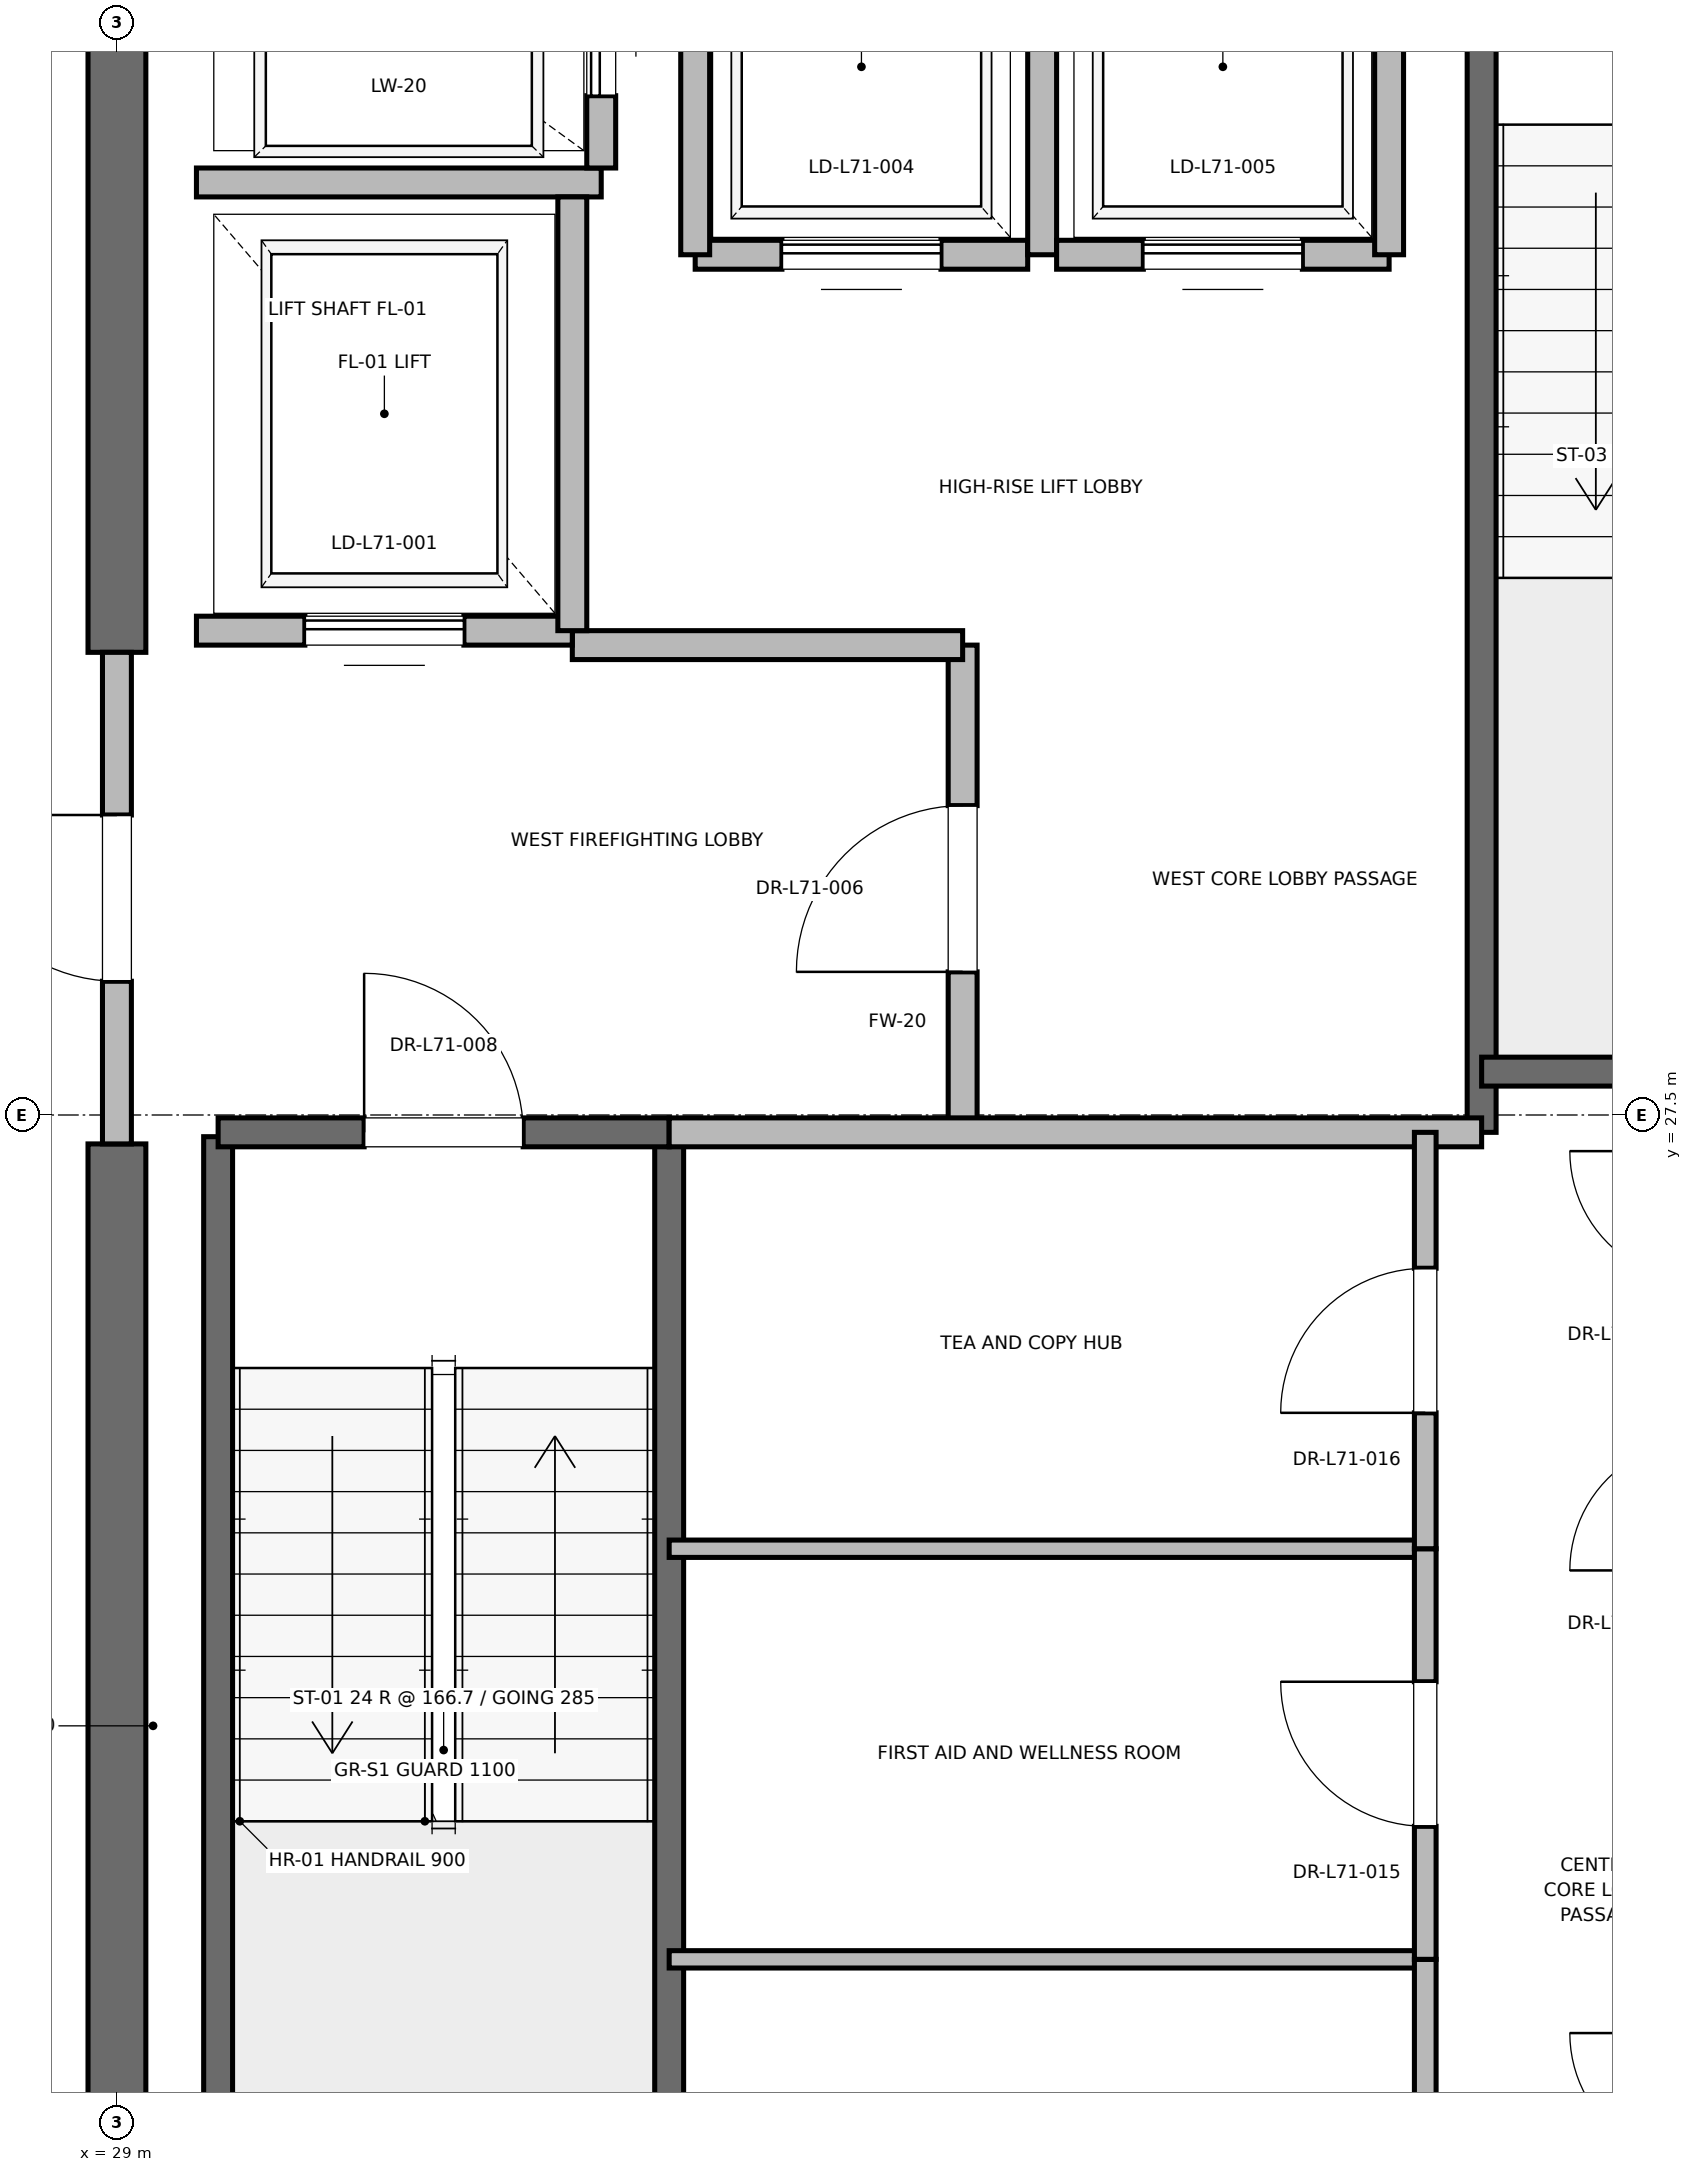
"""IFC4 building model, lengths in metres.
Left out: names, types, materials, properties, quantities, classifications, styles, units other than length and angle.
Written with IfcOpenShell. Run it as: python <this file> out.ifc"""

import sys

from ifc_helpers import new_model, si_unit, direction, frame, frame_2d, origin, place, context, subcontext, project, spatial, rectangle, extrude, element, fill, save


model = new_model("IFC4")
c1 = context("Model", 3, precision=1e-05, world=origin(), true_north=direction((0.0, 1.0)))
c2 = subcontext(c1, "Body", "Model", "MODEL_VIEW")
j1 = project(units=[si_unit("LENGTHUNIT", "METRE"), si_unit("PLANEANGLEUNIT", "RADIAN")], contexts=[c1])
p1 = place(None, origin())
s1 = spatial("IfcSite", under=j1, at=p1, CompositionType="ELEMENT")
p2 = place(p1, origin())
s2 = spatial("IfcBuilding", under=s1, at=p2, CompositionType="ELEMENT")
p3 = place(p2, frame((0.0, 0.0, 306.8)))
s3 = spatial("IfcBuildingStorey", under=s2, at=p3, CompositionType="ELEMENT", Elevation=306.8)
p4 = place(p3, frame((29.0, 18.5, 0.0), z_axis=(0.0, 0.0, 1.0), x_axis=(0.0, 1.0, 0.0)))
e1 = element("IfcWall", 1, at=p4, inside=s3, PredefinedType="SHEAR", context=c2, shape_type="SweptSolid", body=[
    extrude(rectangle(XDim=8.8, YDim=0.4, at=frame_2d((4.4, 0.0))), origin(), (0.0, 0.0, 1.0), 3.785),
])
p5 = place(p3, frame((29.0, 30.7, 0.0), z_axis=(0.0, 0.0, 1.0), x_axis=(0.0, 1.0, 0.0)))
e2 = element("IfcWall", 2, at=p5, inside=s3, PredefinedType="SHEAR", context=c2, shape_type="SweptSolid", body=[
    extrude(rectangle(XDim=5.8, YDim=0.4, at=frame_2d((2.9, 0.0))), origin(), (0.0, 0.0, 1.0), 3.785),
])
p6 = place(p3, frame((29.7, 19.2, 0.0), z_axis=(0.0, 0.0, 1.0), x_axis=(0.0, 1.0, 0.0)))
e3 = element("IfcWall", 3, at=p6, inside=s3, PredefinedType="SOLIDWALL", context=c2, shape_type="SweptSolid", body=[
    extrude(rectangle(XDim=8.15, YDim=0.2, at=frame_2d((4.075, 0.0))), origin(), (0.0, 0.0, 1.0), 3.785),
])
p7 = place(p3, frame((32.82, 18.6, 0.0), z_axis=(0.0, 0.0, 1.0), x_axis=(0.0, 1.0, 0.0)))
e4 = element("IfcWall", 4, at=p7, inside=s3, PredefinedType="SOLIDWALL", context=c2, shape_type="SweptSolid", body=[
    extrude(rectangle(XDim=8.78, YDim=0.2, at=frame_2d((4.39, 0.0))), origin(), (0.0, 0.0, 1.0), 3.785),
])
p8 = place(p3, frame((29.7, 27.38, 0.0), z_axis=(0.0, 0.0, 1.0), x_axis=(1.0, 0.0, 0.0)))
e5 = element("IfcWall", 5, at=p8, inside=s3, PredefinedType="SOLIDWALL", context=c2, shape_type="SweptSolid", body=[
    extrude(rectangle(XDim=3.12, YDim=0.2, at=frame_2d((1.56, 0.0))), origin(), (0.0, 0.0, 1.0), 3.785),
])
p9 = place(p8, frame((1.01, 0.0, 0.0)))
e6 = element("IfcOpeningElement", 6, at=p9, cuts=e5, PredefinedType="OPENING", context=c2, shape_type="SweptSolid", body=[
    extrude(rectangle(XDim=1.1, YDim=2.15, at=frame_2d((0.55, 1.075))), frame((0.0, 0.1, 0.0), z_axis=(0.0, -1.0, 0.0), x_axis=(1.0, 0.0, 0.0)), (0.0, 0.0, 1.0), 0.2),
])
p10 = place(p3, frame((38.44, 27.38, 0.0), z_axis=(0.0, 0.0, 1.0), x_axis=(0.0, 1.0, 0.0)))
e7 = element("IfcWall", 7, at=p10, inside=s3, PredefinedType="SOLIDWALL", context=c2, shape_type="SweptSolid", body=[
    extrude(rectangle(XDim=8.87, YDim=0.2, at=frame_2d((4.435, 0.0))), origin(), (0.0, 0.0, 1.0), 3.785),
])
p11 = place(p3, frame((38.44, 27.8, 0.0), z_axis=(0.0, 0.0, 1.0), x_axis=(1.0, 0.0, 0.0)))
e8 = element("IfcWall", 8, at=p11, inside=s3, PredefinedType="SOLIDWALL", context=c2, shape_type="SweptSolid", body=[
    extrude(rectangle(XDim=3.32, YDim=0.2, at=frame_2d((1.66, 0.0))), origin(), (0.0, 0.0, 1.0), 3.785),
])
p12 = place(p3, frame((34.85, 27.38, 0.0), z_axis=(0.0, 0.0, 1.0), x_axis=(0.0, 1.0, 0.0)))
e9 = element("IfcWall", 9, at=p12, inside=s3, PredefinedType="PARTITIONING", context=c2, shape_type="SweptSolid", body=[
    extrude(rectangle(XDim=3.37, YDim=0.2, at=frame_2d((1.685, 0.0))), origin(), (0.0, 0.0, 1.0), 3.785),
])
p13 = place(p12, frame((1.11, 0.0, 0.0)))
e10 = element("IfcOpeningElement", 10, at=p13, cuts=e9, PredefinedType="OPENING", context=c2, shape_type="SweptSolid", body=[
    extrude(rectangle(XDim=1.15, YDim=2.2, at=frame_2d((0.575, 1.1))), frame((0.0, 0.1, 0.0), z_axis=(0.0, -1.0, 0.0), x_axis=(1.0, 0.0, 0.0)), (0.0, 0.0, 1.0), 0.2),
])
p14 = place(p3, frame((29.0, 27.3, 0.0), z_axis=(0.0, 0.0, 1.0), x_axis=(0.0, 1.0, 0.0)))
e11 = element("IfcWall", 11, at=p14, inside=s3, PredefinedType="PARTITIONING", context=c2, shape_type="SweptSolid", body=[
    extrude(rectangle(XDim=3.4, YDim=0.2, at=frame_2d((1.7, 0.0))), origin(), (0.0, 0.0, 1.0), 2.865),
])
p15 = place(p14, frame((1.125, 0.0, 0.0)))
e12 = element("IfcOpeningElement", 12, at=p15, cuts=e11, PredefinedType="OPENING", context=c2, shape_type="SweptSolid", body=[
    extrude(rectangle(XDim=1.15, YDim=2.2, at=frame_2d((0.575, 1.1))), frame((0.0, 0.1, 0.0), z_axis=(0.0, -1.0, 0.0), x_axis=(1.0, 0.0, 0.0)), (0.0, 0.0, 1.0), 0.2),
])
p16 = place(p3, frame((32.82, 27.38, 0.0), z_axis=(0.0, 0.0, 1.0), x_axis=(1.0, 0.0, 0.0)))
e13 = element("IfcWall", 13, at=p16, inside=s3, PredefinedType="PARTITIONING", context=c2, shape_type="SweptSolid", body=[
    extrude(rectangle(XDim=5.62, YDim=0.2, at=frame_2d((2.81, 0.0))), origin(), (0.0, 0.0, 1.0), 3.785),
])
p17 = place(p3, frame((32.15, 30.75, 0.0), z_axis=(0.0, 0.0, 1.0), x_axis=(1.0, 0.0, 0.0)))
e14 = element("IfcWall", 14, at=p17, inside=s3, PredefinedType="PARTITIONING", context=c2, shape_type="SweptSolid", body=[
    extrude(rectangle(XDim=2.7, YDim=0.2, at=frame_2d((1.35, 0.0))), origin(), (0.0, 0.0, 1.0), 3.785),
])
p18 = place(p3, frame((29.55, 30.85, 0.0), z_axis=(0.0, 0.0, 1.0), x_axis=(1.0, 0.0, 0.0)))
e15 = element("IfcWall", 15, at=p18, inside=s3, PredefinedType="SOLIDWALL", context=c2, shape_type="SweptSolid", body=[
    extrude(rectangle(XDim=2.6, YDim=0.2, at=frame_2d((1.3, 0.0))), origin(), (0.0, 0.0, 1.0), 2.865),
])
p19 = place(p18, frame((0.75, 0.0, 0.0)))
e16 = element("IfcOpeningElement", 16, at=p19, cuts=e15, PredefinedType="OPENING", context=c2, shape_type="SweptSolid", body=[
    extrude(rectangle(XDim=1.1, YDim=2.2, at=frame_2d((0.55, 1.1))), frame((0.0, 0.1, 0.0), z_axis=(0.0, -1.0, 0.0), x_axis=(1.0, 0.0, 0.0)), (0.0, 0.0, 1.0), 0.2),
])
p20 = place(p3, frame((29.55, 33.95, 0.0), z_axis=(0.0, 0.0, 1.0), x_axis=(1.0, 0.0, 0.0)))
e17 = element("IfcWall", 17, at=p20, inside=s3, PredefinedType="SOLIDWALL", context=c2, shape_type="SweptSolid", body=[
    extrude(rectangle(XDim=2.8, YDim=0.2, at=frame_2d((1.4, 0.0))), origin(), (0.0, 0.0, 1.0), 3.785),
])
p21 = place(p3, frame((32.15, 30.85, 0.0), z_axis=(0.0, 0.0, 1.0), x_axis=(0.0, 1.0, 0.0)))
e18 = element("IfcWall", 18, at=p21, inside=s3, PredefinedType="SOLIDWALL", context=c2, shape_type="SweptSolid", body=[
    extrude(rectangle(XDim=3.0, YDim=0.2, at=frame_2d((1.5, 0.0))), origin(), (0.0, 0.0, 1.0), 3.785),
])
p22 = place(p3, frame((32.35, 34.05, 0.0), z_axis=(0.0, 0.0, 1.0), x_axis=(0.0, 1.0, 0.0)))
e19 = element("IfcWall", 19, at=p22, inside=s3, PredefinedType="SOLIDWALL", context=c2, shape_type="SweptSolid", body=[
    extrude(rectangle(XDim=2.1, YDim=0.2, at=frame_2d((1.05, 0.0))), origin(), (0.0, 0.0, 1.0), 3.785),
])
p23 = place(p22, frame((0.5, 0.0, 0.0)))
e20 = element("IfcOpeningElement", 20, at=p23, cuts=e19, PredefinedType="OPENING", context=c2, shape_type="SweptSolid", body=[
    extrude(rectangle(XDim=1.1, YDim=2.2, at=frame_2d((0.55, 1.1))), frame((0.0, 0.1, 0.0), z_axis=(0.0, -1.0, 0.0), x_axis=(1.0, 0.0, 0.0)), (0.0, 0.0, 1.0), 0.2),
])
p24 = place(p3, frame((33.0, 33.45, 0.0), z_axis=(0.0, 0.0, 1.0), x_axis=(1.0, 0.0, 0.0)))
e21 = element("IfcWall", 21, at=p24, inside=s3, PredefinedType="SOLIDWALL", context=c2, shape_type="SweptSolid", body=[
    extrude(rectangle(XDim=2.3, YDim=0.2, at=frame_2d((1.15, 0.0))), origin(), (0.0, 0.0, 1.0), 3.785),
])
p25 = place(p24, frame((0.6, 0.0, 0.0)))
e22 = element("IfcOpeningElement", 22, at=p25, cuts=e21, PredefinedType="OPENING", context=c2, shape_type="SweptSolid", body=[
    extrude(rectangle(XDim=1.1, YDim=2.2, at=frame_2d((0.55, 1.1))), frame((0.0, 0.1, 0.0), z_axis=(0.0, -1.0, 0.0), x_axis=(1.0, 0.0, 0.0)), (0.0, 0.0, 1.0), 0.2),
])
p26 = place(p3, frame((33.0, 36.05, 0.0), z_axis=(0.0, 0.0, 1.0), x_axis=(0.0, -1.0, 0.0)))
e23 = element("IfcWall", 23, at=p26, inside=s3, PredefinedType="SOLIDWALL", context=c2, shape_type="SweptSolid", body=[
    extrude(rectangle(XDim=2.6, YDim=0.2, at=frame_2d((1.3, 0.0))), origin(), (0.0, 0.0, 1.0), 3.785),
])
p27 = place(p3, frame((35.4, 33.45, 0.0), z_axis=(0.0, 0.0, 1.0), x_axis=(0.0, 1.0, 0.0)))
e24 = element("IfcWall", 24, at=p27, inside=s3, PredefinedType="SOLIDWALL", context=c2, shape_type="SweptSolid", body=[
    extrude(rectangle(XDim=2.6, YDim=0.2, at=frame_2d((1.3, 0.0))), origin(), (0.0, 0.0, 1.0), 2.865),
])
p28 = place(p3, frame((35.5, 33.45, 0.0), z_axis=(0.0, 0.0, 1.0), x_axis=(1.0, 0.0, 0.0)))
e25 = element("IfcWall", 25, at=p28, inside=s3, PredefinedType="SOLIDWALL", context=c2, shape_type="SweptSolid", body=[
    extrude(rectangle(XDim=2.3, YDim=0.2, at=frame_2d((1.15, 0.0))), origin(), (0.0, 0.0, 1.0), 3.785),
])
p29 = place(p28, frame((0.6, 0.0, 0.0)))
e26 = element("IfcOpeningElement", 26, at=p29, cuts=e25, PredefinedType="OPENING", context=c2, shape_type="SweptSolid", body=[
    extrude(rectangle(XDim=1.1, YDim=2.2, at=frame_2d((0.55, 1.1))), frame((0.0, 0.1, 0.0), z_axis=(0.0, -1.0, 0.0), x_axis=(1.0, 0.0, 0.0)), (0.0, 0.0, 1.0), 0.2),
])
p30 = place(p3, frame((37.8, 33.45, 0.0), z_axis=(0.0, 0.0, 1.0), x_axis=(0.0, 1.0, 0.0)))
e27 = element("IfcWall", 27, at=p30, inside=s3, PredefinedType="SOLIDWALL", context=c2, shape_type="SweptSolid", body=[
    extrude(rectangle(XDim=2.6, YDim=0.2, at=frame_2d((1.3, 0.0))), origin(), (0.0, 0.0, 1.0), 2.865),
])
for number, where, z_axis, x_axis in (
    (28, (32.82, 21.66, 0.0), (0.0, 0.0, 1.0), (1.0, 0.0, 0.0)),
    (29, (32.82, 24.5, 0.0), (0.0, 0.0, 1.0), (1.0, 0.0, 0.0)),
):
    element("IfcWall", number, at=place(p3, frame(where, z_axis=z_axis, x_axis=x_axis)), inside=s3, PredefinedType="PARTITIONING", context=c2, shape_type="SweptSolid", body=[
        extrude(rectangle(XDim=5.23, YDim=0.12, at=frame_2d((2.615, 0.0))), origin(), (0.0, 0.0, 1.0), 2.85),
    ])
p31 = place(p3, frame((38.05, 18.6, 0.0), z_axis=(0.0, 0.0, 1.0), x_axis=(0.0, 1.0, 0.0)))
e30 = element("IfcWall", 30, at=p31, inside=s3, PredefinedType="PARTITIONING", context=c2, shape_type="SweptSolid", body=[
    extrude(rectangle(XDim=3.06, YDim=0.15, at=frame_2d((1.53, 0.0))), origin(), (0.0, 0.0, 1.0), 2.85),
])
p32 = place(p31, frame((1.03, 0.0, 0.0)))
e31 = element("IfcOpeningElement", 31, at=p32, cuts=e30, PredefinedType="OPENING", context=c2, shape_type="SweptSolid", body=[
    extrude(rectangle(XDim=1.0, YDim=2.15, at=frame_2d((0.5, 1.075))), frame((0.0, 0.075, 0.0), z_axis=(0.0, -1.0, 0.0), x_axis=(1.0, 0.0, 0.0)), (0.0, 0.0, 1.0), 0.15),
])
p33 = place(p3, frame((38.05, 21.66, 0.0), z_axis=(0.0, 0.0, 1.0), x_axis=(0.0, 1.0, 0.0)))
e32 = element("IfcWall", 32, at=p33, inside=s3, PredefinedType="PARTITIONING", context=c2, shape_type="SweptSolid", body=[
    extrude(rectangle(XDim=2.84, YDim=0.15, at=frame_2d((1.42, 0.0))), origin(), (0.0, 0.0, 1.0), 2.85),
])
p34 = place(p33, frame((0.92, 0.0, 0.0)))
e33 = element("IfcOpeningElement", 33, at=p34, cuts=e32, PredefinedType="OPENING", context=c2, shape_type="SweptSolid", body=[
    extrude(rectangle(XDim=1.0, YDim=2.15, at=frame_2d((0.5, 1.075))), frame((0.0, 0.075, 0.0), z_axis=(0.0, -1.0, 0.0), x_axis=(1.0, 0.0, 0.0)), (0.0, 0.0, 1.0), 0.15),
])
p35 = place(p3, frame((38.05, 24.5, 0.0), z_axis=(0.0, 0.0, 1.0), x_axis=(0.0, 1.0, 0.0)))
e34 = element("IfcWall", 34, at=p35, inside=s3, PredefinedType="PARTITIONING", context=c2, shape_type="SweptSolid", body=[
    extrude(rectangle(XDim=2.88, YDim=0.15, at=frame_2d((1.44, 0.0))), origin(), (0.0, 0.0, 1.0), 2.85),
])
p36 = place(p35, frame((0.94, 0.0, 0.0)))
e35 = element("IfcOpeningElement", 35, at=p36, cuts=e34, PredefinedType="OPENING", context=c2, shape_type="SweptSolid", body=[
    extrude(rectangle(XDim=1.0, YDim=2.15, at=frame_2d((0.5, 1.075))), frame((0.0, 0.075, 0.0), z_axis=(0.0, -1.0, 0.0), x_axis=(1.0, 0.0, 0.0)), (0.0, 0.0, 1.0), 0.15),
])
p37 = place(p9, origin())
e36 = element("IfcDoor", 36, at=p37, inside=s3, OperationType="SINGLE_SWING_LEFT", PredefinedType="DOOR", context=c2, shape_type="SweptSolid", body=[
    extrude(rectangle(XDim=1.1, YDim=2.15, at=frame_2d((0.55, 1.075))), frame((0.0, 0.025, 0.0), z_axis=(0.0, -1.0, 0.0), x_axis=(1.0, 0.0, 0.0)), (0.0, 0.0, 1.0), 0.05),
])
fill(e6, e36)
p38 = place(p13, origin())
e37 = element("IfcDoor", 37, at=p38, inside=s3, OperationType="SINGLE_SWING_LEFT", PredefinedType="DOOR", context=c2, shape_type="SweptSolid", body=[
    extrude(rectangle(XDim=1.15, YDim=2.2, at=frame_2d((0.575, 1.1))), frame((0.0, 0.025, 0.0), z_axis=(0.0, -1.0, 0.0), x_axis=(1.0, 0.0, 0.0)), (0.0, 0.0, 1.0), 0.05),
])
fill(e10, e37)
p39 = place(p15, origin())
e38 = element("IfcDoor", 38, at=p39, inside=s3, OperationType="SINGLE_SWING_RIGHT", PredefinedType="DOOR", context=c2, shape_type="SweptSolid", body=[
    extrude(rectangle(XDim=1.15, YDim=2.2, at=frame_2d((0.575, 1.1))), frame((0.0, 0.025, 0.0), z_axis=(0.0, -1.0, 0.0), x_axis=(1.0, 0.0, 0.0)), (0.0, 0.0, 1.0), 0.05),
])
fill(e12, e38)
p40 = place(p19, origin())
e39 = element("IfcDoor", 39, at=p40, inside=s3, OperationType="SLIDING_TO_RIGHT", PredefinedType="DOOR", context=c2, shape_type="SweptSolid", body=[
    extrude(rectangle(XDim=1.1, YDim=2.2, at=frame_2d((0.55, 1.1))), frame((0.0, 0.025, 0.0), z_axis=(0.0, -1.0, 0.0), x_axis=(1.0, 0.0, 0.0)), (0.0, 0.0, 1.0), 0.05),
])
fill(e16, e39)
p41 = place(p23, origin())
e40 = element("IfcDoor", 40, at=p41, inside=s3, OperationType="SLIDING_TO_RIGHT", PredefinedType="DOOR", context=c2, shape_type="SweptSolid", body=[
    extrude(rectangle(XDim=1.1, YDim=2.2, at=frame_2d((0.55, 1.1))), frame((0.0, 0.025, 0.0), z_axis=(0.0, -1.0, 0.0), x_axis=(1.0, 0.0, 0.0)), (0.0, 0.0, 1.0), 0.05),
])
fill(e20, e40)
p42 = place(p25, origin())
e41 = element("IfcDoor", 41, at=p42, inside=s3, OperationType="SLIDING_TO_RIGHT", PredefinedType="DOOR", context=c2, shape_type="SweptSolid", body=[
    extrude(rectangle(XDim=1.1, YDim=2.2, at=frame_2d((0.55, 1.1))), frame((0.0, 0.025, 0.0), z_axis=(0.0, -1.0, 0.0), x_axis=(1.0, 0.0, 0.0)), (0.0, 0.0, 1.0), 0.05),
])
fill(e22, e41)
p43 = place(p29, origin())
e42 = element("IfcDoor", 42, at=p43, inside=s3, OperationType="SLIDING_TO_RIGHT", PredefinedType="DOOR", context=c2, shape_type="SweptSolid", body=[
    extrude(rectangle(XDim=1.1, YDim=2.2, at=frame_2d((0.55, 1.1))), frame((0.0, 0.025, 0.0), z_axis=(0.0, -1.0, 0.0), x_axis=(1.0, 0.0, 0.0)), (0.0, 0.0, 1.0), 0.05),
])
fill(e26, e42)
p44 = place(p34, origin())
e43 = element("IfcDoor", 43, at=p44, inside=s3, OperationType="SINGLE_SWING_RIGHT", PredefinedType="DOOR", context=c2, shape_type="SweptSolid", body=[
    extrude(rectangle(XDim=1.0, YDim=2.15, at=frame_2d((0.5, 1.075))), frame((0.0, 0.025, 0.0), z_axis=(0.0, -1.0, 0.0), x_axis=(1.0, 0.0, 0.0)), (0.0, 0.0, 1.0), 0.05),
])
fill(e33, e43)
p45 = place(p36, origin())
e44 = element("IfcDoor", 44, at=p45, inside=s3, OperationType="SINGLE_SWING_LEFT", PredefinedType="DOOR", context=c2, shape_type="SweptSolid", body=[
    extrude(rectangle(XDim=1.0, YDim=2.15, at=frame_2d((0.5, 1.075))), frame((0.0, 0.025, 0.0), z_axis=(0.0, -1.0, 0.0), x_axis=(1.0, 0.0, 0.0)), (0.0, 0.0, 1.0), 0.05),
])
fill(e35, e44)
save(model, sys.argv[1])
